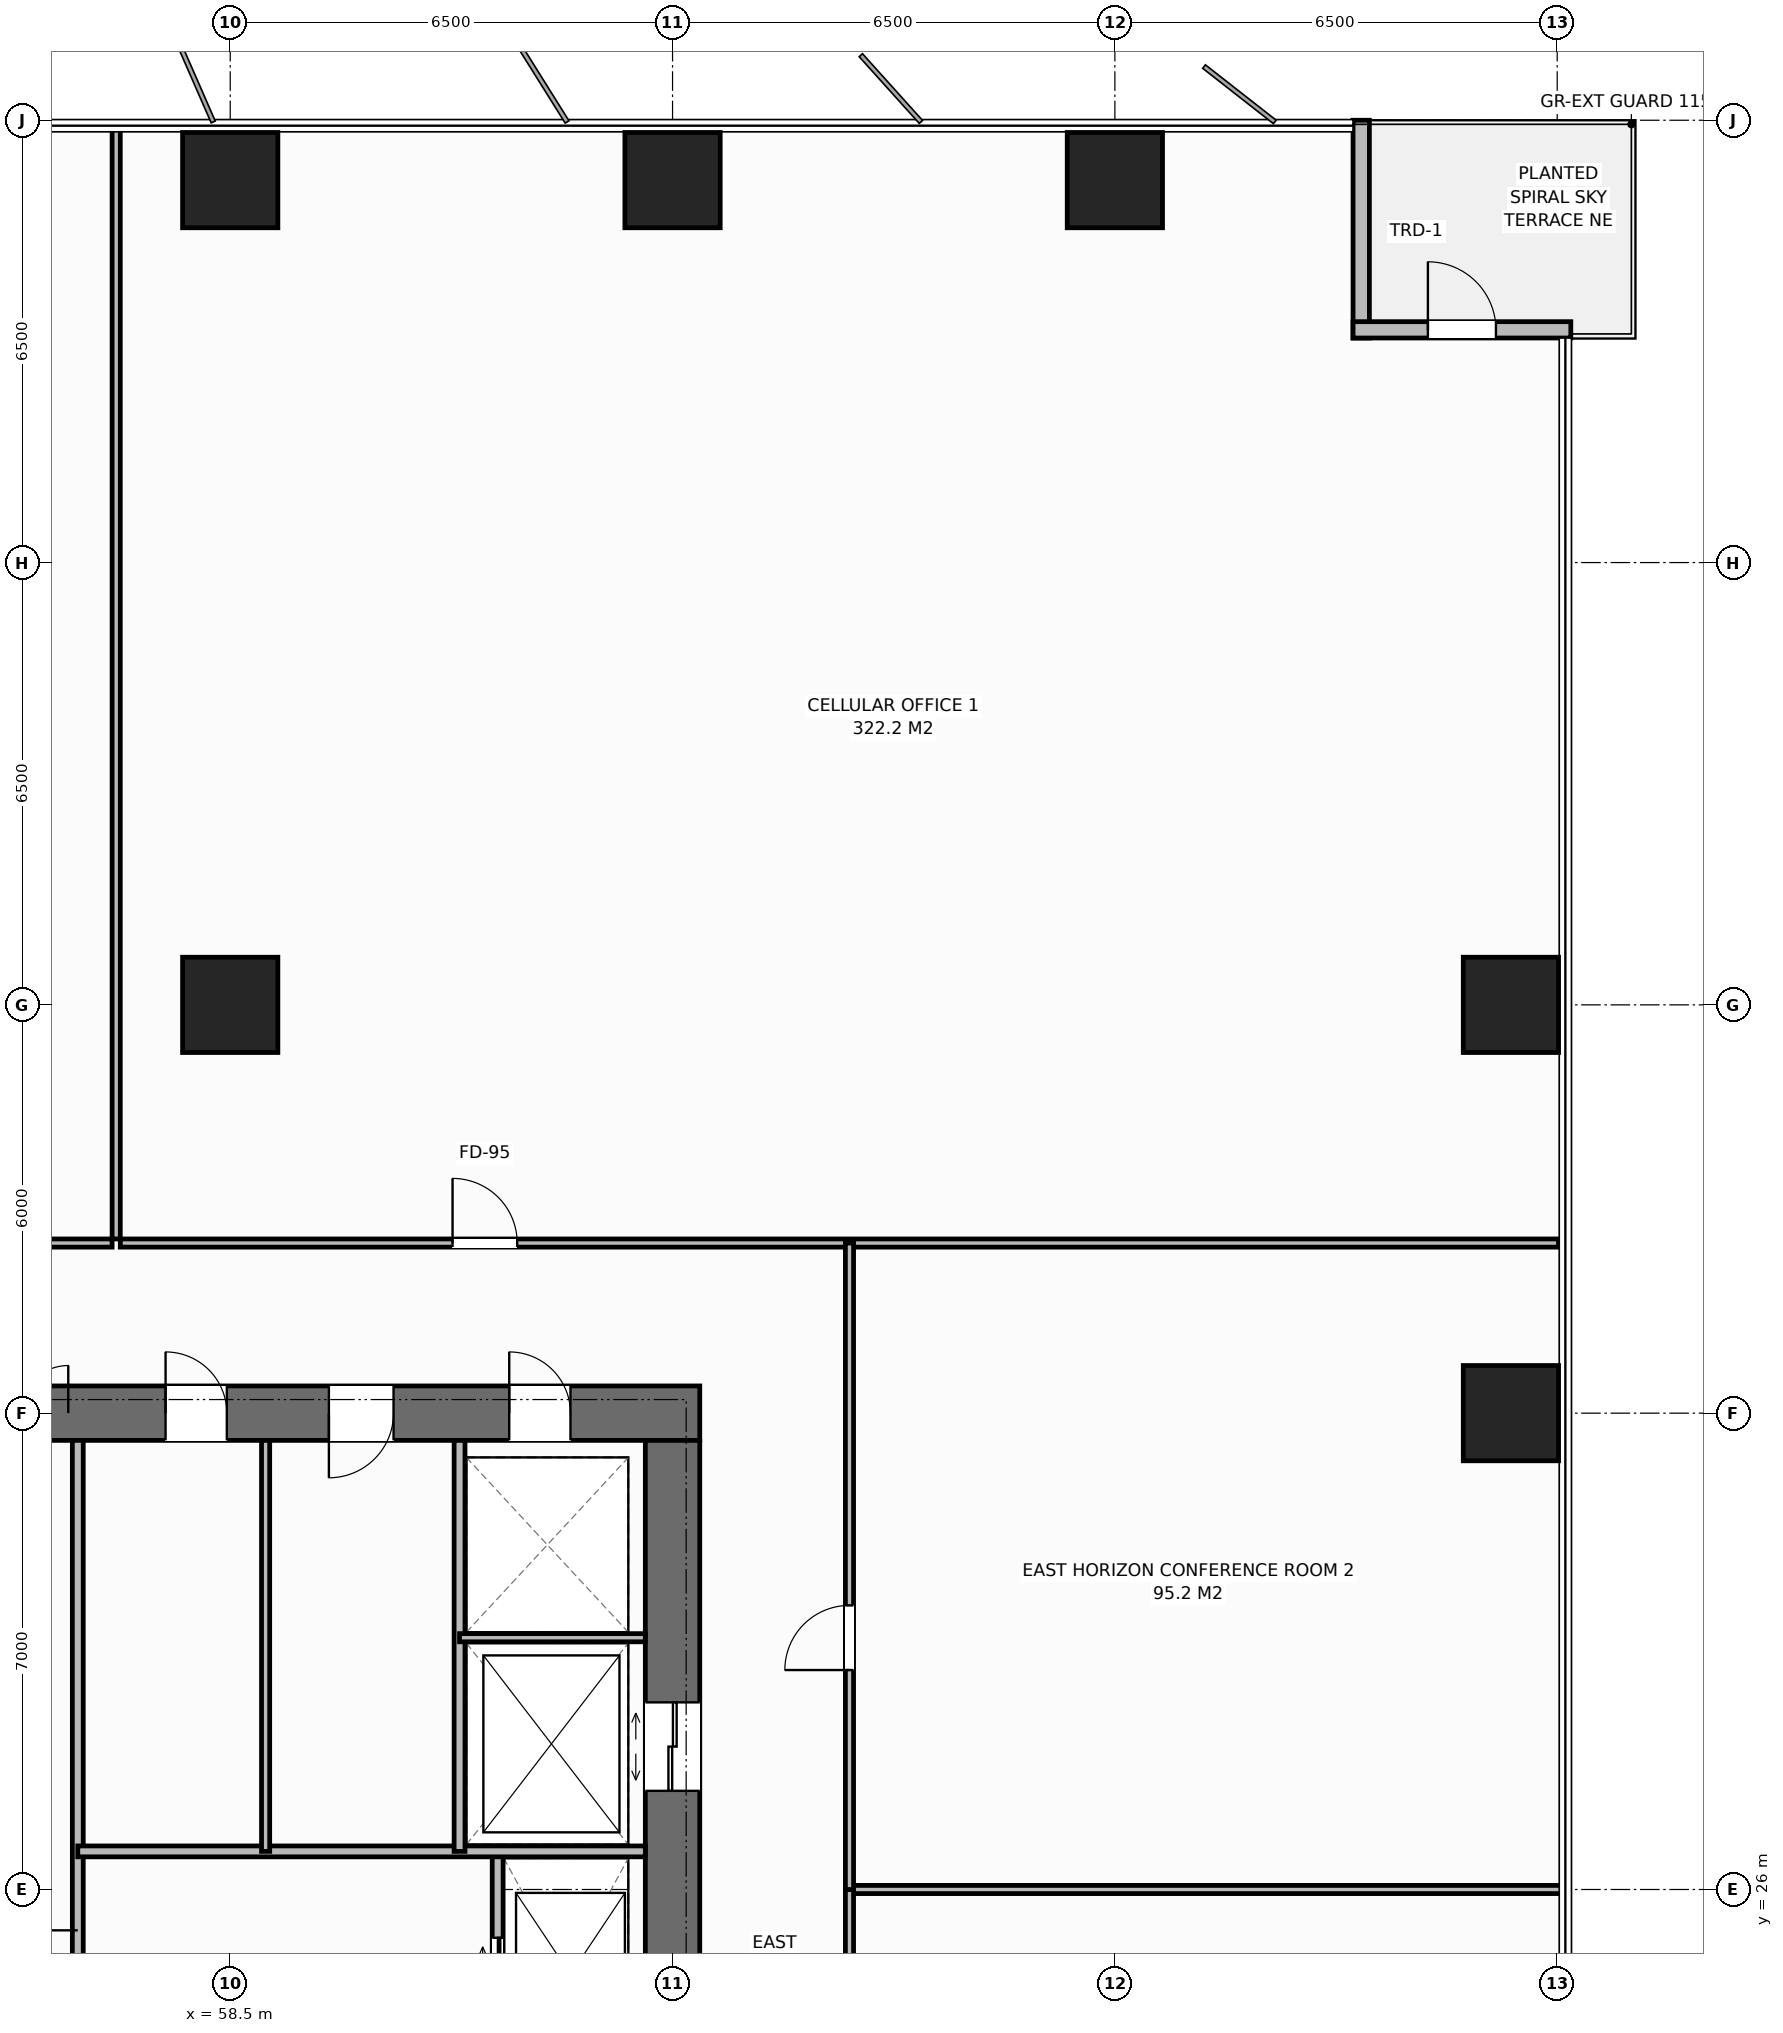
"""IFC4 building model, lengths in metres.
Left out: names, types, materials, properties, quantities, classifications, styles, units other than length and angle.
Written with IfcOpenShell. Run it as: python <this file> out.ifc"""

import sys

from ifc_helpers import new_model, si_unit, direction, frame, frame_2d, origin, origin_2d, place, context, subcontext, project, spatial, rectangle, extrude, element, fill, save


model = new_model("IFC4")
c1 = context("Model", 3, precision=1e-05, world=origin(), true_north=direction((0.0, 1.0)))
c2 = subcontext(c1, "Body", "Model", "MODEL_VIEW")
j1 = project(units=[si_unit("LENGTHUNIT", "METRE"), si_unit("PLANEANGLEUNIT", "RADIAN")], contexts=[c1])
p1 = place(None, origin())
s1 = spatial("IfcSite", under=j1, at=p1, CompositionType="ELEMENT")
p2 = place(p1, origin())
s2 = spatial("IfcBuilding", under=s1, at=p2, CompositionType="ELEMENT")
p3 = place(p2, frame((0.0, 0.0, 62.0)))
s3 = spatial("IfcBuildingStorey", under=s2, at=p3, CompositionType="ELEMENT", Elevation=62.0)
p4 = place(p3, frame((51.6, 33.0, 0.0), z_axis=(0.0, 0.0, 1.0), x_axis=(1.0, 0.0, 0.0)))
e1 = element("IfcWall", 1, at=p4, inside=s3, PredefinedType="SHEAR", context=c2, shape_type="SweptSolid", body=[
    extrude(rectangle(XDim=13.8, YDim=0.8, at=frame_2d((6.9, 0.0))), origin(), (0.0, 0.0, 1.0), 3.8),
])
p5 = place(p4, frame((3.12, 0.0, 0.0)))
e2 = element("IfcOpeningElement", 2, at=p5, cuts=e1, PredefinedType="OPENING", context=c2, shape_type="SweptSolid", body=[
    extrude(rectangle(XDim=1.4, YDim=2.2, at=frame_2d((0.7, 1.1))), frame((0.0, 0.41, 0.0), z_axis=(0.0, -1.0, 0.0), x_axis=(1.0, 0.0, 0.0)), (0.0, 0.0, 1.0), 0.82),
])
p6 = place(p4, frame((11.0, 0.0, 0.0)))
e3 = element("IfcOpeningElement", 3, at=p6, cuts=e1, PredefinedType="OPENING", context=c2, shape_type="SweptSolid", body=[
    extrude(rectangle(XDim=0.9, YDim=2.15, at=frame_2d((0.45, 1.075))), frame((0.0, 0.41, 0.0), z_axis=(0.0, -1.0, 0.0), x_axis=(1.0, 0.0, 0.0)), (0.0, 0.0, 1.0), 0.82),
])
p7 = place(p4, frame((5.95, 0.0, 0.0)))
e4 = element("IfcOpeningElement", 4, at=p7, cuts=e1, PredefinedType="OPENING", context=c2, shape_type="SweptSolid", body=[
    extrude(rectangle(XDim=0.9, YDim=2.15, at=frame_2d((0.45, 1.075))), frame((0.0, 0.41, 0.0), z_axis=(0.0, -1.0, 0.0), x_axis=(1.0, 0.0, 0.0)), (0.0, 0.0, 1.0), 0.82),
])
p8 = place(p4, frame((8.35, 0.0, 0.0)))
e5 = element("IfcOpeningElement", 5, at=p8, cuts=e1, PredefinedType="OPENING", context=c2, shape_type="SweptSolid", body=[
    extrude(rectangle(XDim=0.95, YDim=2.15, at=frame_2d((0.475, 1.075))), frame((0.0, 0.41, 0.0), z_axis=(0.0, -1.0, 0.0), x_axis=(1.0, 0.0, 0.0)), (0.0, 0.0, 1.0), 0.82),
])
p9 = place(p3, frame((65.0, 19.4, 0.0), z_axis=(0.0, 0.0, 1.0), x_axis=(0.0, 1.0, 0.0)))
e6 = element("IfcWall", 6, at=p9, inside=s3, PredefinedType="SHEAR", context=c2, shape_type="SweptSolid", body=[
    extrude(rectangle(XDim=13.2, YDim=0.8, at=frame_2d((6.6, 0.0))), origin(), (0.0, 0.0, 1.0), 3.8),
])
p10 = place(p9, frame((8.05, 0.0, 0.0)))
e7 = element("IfcOpeningElement", 7, at=p10, cuts=e6, PredefinedType="OPENING", context=c2, shape_type="SweptSolid", body=[
    extrude(rectangle(XDim=1.3, YDim=2.2, at=frame_2d((0.65, 1.1))), frame((0.0, 0.41, 0.0), z_axis=(0.0, -1.0, 0.0), x_axis=(1.0, 0.0, 0.0)), (0.0, 0.0, 1.0), 0.82),
])
for number, where, z_axis, x_axis in (
    (8, (58.5, 39.0, 0.0), (0.0, 0.0, 1.0), (1.0, 0.0, 0.0)),
    (9, (58.5, 51.12, 0.0), (0.0, 0.0, 1.0), (1.0, 0.0, 0.0)),
    (10, (65.0, 51.12, 0.0), (0.0, 0.0, 1.0), (1.0, 0.0, 0.0)),
    (11, (71.5, 51.12, 0.0), (0.0, 0.0, 1.0), (1.0, 0.0, 0.0)),
    (12, (77.32, 33.0, 0.0), (0.0, 0.0, 1.0), (1.0, 0.0, 0.0)),
    (13, (77.32, 39.0, 0.0), (0.0, 0.0, 1.0), (1.0, 0.0, 0.0)),
):
    element("IfcColumn", number, at=place(p3, frame(where, z_axis=z_axis, x_axis=x_axis)), inside=s3, PredefinedType="COLUMN", context=c2, shape_type="SweptSolid", body=[
        extrude(rectangle(XDim=1.4, YDim=1.4, at=origin_2d()), origin(), (0.0, 0.0, 1.0), 3.8),
    ])
p11 = place(p3, frame((75.12, 52.0, 0.0), z_axis=(0.0, 0.0, 1.0), x_axis=(0.0, -1.0, 0.0)))
e14 = element("IfcWall", 14, at=p11, inside=s3, PredefinedType="STANDARD", context=c2, shape_type="SweptSolid", body=[
    extrude(rectangle(XDim=3.2, YDim=0.24, at=frame_2d((1.6, 0.0))), origin(), (0.0, 0.0, 1.0), 3.55),
])
p12 = place(p3, frame((75.0, 48.92, 0.0), z_axis=(0.0, 0.0, 1.0), x_axis=(1.0, 0.0, 0.0)))
e15 = element("IfcWall", 15, at=p12, inside=s3, PredefinedType="STANDARD", context=c2, shape_type="SweptSolid", body=[
    extrude(rectangle(XDim=3.2, YDim=0.24, at=frame_2d((1.6, 0.0))), origin(), (0.0, 0.0, 1.0), 3.55),
])
p13 = place(p12, frame((1.1, 0.0, 0.0)))
e16 = element("IfcOpeningElement", 16, at=p13, cuts=e15, PredefinedType="OPENING", context=c2, shape_type="SweptSolid", body=[
    extrude(rectangle(XDim=1.0, YDim=2.2, at=frame_2d((0.5, 1.1))), frame((0.0, 0.13, 0.0), z_axis=(0.0, -1.0, 0.0), x_axis=(1.0, 0.0, 0.0)), (0.0, 0.0, 1.0), 0.26),
])
p14 = place(p3, frame((56.26, 23.09, 0.0), z_axis=(0.0, 0.0, 1.0), x_axis=(0.0, 1.0, 0.0)))
e17 = element("IfcWall", 17, at=p14, inside=s3, PredefinedType="STANDARD", context=c2, shape_type="SweptSolid", body=[
    extrude(rectangle(XDim=9.51, YDim=0.16, at=frame_2d((4.755, 0.0))), origin(), (0.0, 0.0, 1.0), 3.55),
])
p15 = place(p14, frame((1.01, 0.0, 0.0)))
e18 = element("IfcOpeningElement", 18, at=p15, cuts=e17, PredefinedType="OPENING", context=c2, shape_type="SweptSolid", body=[
    extrude(rectangle(XDim=1.3, YDim=2.2, at=frame_2d((0.65, 1.1))), frame((0.0, 0.09, 0.0), z_axis=(0.0, -1.0, 0.0), x_axis=(1.0, 0.0, 0.0)), (0.0, 0.0, 1.0), 0.18),
])
p16 = place(p3, frame((62.43, 23.09, 0.0), z_axis=(0.0, 0.0, 1.0), x_axis=(0.0, 1.0, 0.0)))
e19 = element("IfcWall", 19, at=p16, inside=s3, PredefinedType="STANDARD", context=c2, shape_type="SweptSolid", body=[
    extrude(rectangle(XDim=3.47, YDim=0.16, at=frame_2d((1.735, 0.0))), origin(), (0.0, 0.0, 1.0), 3.55),
])
p17 = place(p16, frame((1.1, 0.0, 0.0)))
e20 = element("IfcOpeningElement", 20, at=p17, cuts=e19, PredefinedType="OPENING", context=c2, shape_type="SweptSolid", body=[
    extrude(rectangle(XDim=1.1, YDim=2.2, at=frame_2d((0.55, 1.1))), frame((0.0, 0.09, 0.0), z_axis=(0.0, -1.0, 0.0), x_axis=(1.0, 0.0, 0.0)), (0.0, 0.0, 1.0), 0.18),
])
p18 = place(p3, frame((56.26, 26.56, 0.0), z_axis=(0.0, 0.0, 1.0), x_axis=(1.0, 0.0, 0.0)))
e21 = element("IfcWall", 21, at=p18, inside=s3, PredefinedType="STANDARD", context=c2, shape_type="SweptSolid", body=[
    extrude(rectangle(XDim=8.34, YDim=0.16, at=frame_2d((4.17, 0.0))), origin(), (0.0, 0.0, 1.0), 3.55),
])
p19 = place(p3, frame((61.87, 26.56, 0.0), z_axis=(0.0, 0.0, 1.0), x_axis=(0.0, 1.0, 0.0)))
e22 = element("IfcWall", 22, at=p19, inside=s3, PredefinedType="STANDARD", context=c2, shape_type="SweptSolid", body=[
    extrude(rectangle(XDim=6.04, YDim=0.16, at=frame_2d((3.02, 0.0))), origin(), (0.0, 0.0, 1.0), 3.55),
])
p20 = place(p3, frame((61.87, 29.7, 0.0), z_axis=(0.0, 0.0, 1.0), x_axis=(1.0, 0.0, 0.0)))
e23 = element("IfcWall", 23, at=p20, inside=s3, PredefinedType="PARTITIONING", context=c2, shape_type="SweptSolid", body=[
    extrude(rectangle(XDim=2.73, YDim=0.12, at=frame_2d((1.365, 0.0))), origin(), (0.0, 0.0, 1.0), 3.55),
])
p21 = place(p3, frame((59.02, 26.56, 0.0), z_axis=(0.0, 0.0, 1.0), x_axis=(0.0, 1.0, 0.0)))
e24 = element("IfcWall", 24, at=p21, inside=s3, PredefinedType="PARTITIONING", context=c2, shape_type="SweptSolid", body=[
    extrude(rectangle(XDim=6.04, YDim=0.12, at=frame_2d((3.02, 0.0))), origin(), (0.0, 0.0, 1.0), 3.55),
])
p22 = place(p3, frame((56.824, 35.56, 0.0), z_axis=(0.0, 0.0, 1.0), x_axis=(0.0, 1.0, 0.0)))
e25 = element("IfcWall", 25, at=p22, inside=s3, PredefinedType="PARTITIONING", context=c2, shape_type="SweptSolid", body=[
    extrude(rectangle(XDim=16.42, YDim=0.12, at=frame_2d((8.21, 0.0))), origin(), (0.0, 0.0, 1.0), 3.55),
])
p23 = place(p3, frame((34.588, 35.5, 0.0), z_axis=(0.0, 0.0, 1.0), x_axis=(1.0, 0.0, 0.0)))
e26 = element("IfcWall", 26, at=p23, inside=s3, PredefinedType="PARTITIONING", context=c2, shape_type="SweptSolid", body=[
    extrude(rectangle(XDim=22.176, YDim=0.12, at=frame_2d((11.088, 0.0))), origin(), (0.0, 0.0, 1.0), 3.55),
])
p24 = place(p23, frame((0.48, 0.0, 0.0)))
e27 = element("IfcOpeningElement", 27, at=p24, cuts=e26, PredefinedType="OPENING", context=c2, shape_type="SweptSolid", body=[
    extrude(rectangle(XDim=0.95, YDim=2.15, at=frame_2d((0.475, 1.075))), frame((0.0, 0.07, 0.0), z_axis=(0.0, -1.0, 0.0), x_axis=(1.0, 0.0, 0.0)), (0.0, 0.0, 1.0), 0.14),
])
p25 = place(p3, frame((56.884, 35.5, 0.0), z_axis=(0.0, 0.0, 1.0), x_axis=(1.0, 0.0, 0.0)))
e28 = element("IfcWall", 28, at=p25, inside=s3, PredefinedType="PARTITIONING", context=c2, shape_type="SweptSolid", body=[
    extrude(rectangle(XDim=21.136, YDim=0.12, at=frame_2d((10.568, 0.0))), origin(), (0.0, 0.0, 1.0), 3.55),
])
p26 = place(p25, frame((4.883, 0.0, 0.0)))
e29 = element("IfcOpeningElement", 29, at=p26, cuts=e28, PredefinedType="OPENING", context=c2, shape_type="SweptSolid", body=[
    extrude(rectangle(XDim=0.95, YDim=2.15, at=frame_2d((0.475, 1.075))), frame((0.0, 0.07, 0.0), z_axis=(0.0, -1.0, 0.0), x_axis=(1.0, 0.0, 0.0)), (0.0, 0.0, 1.0), 0.14),
])
p27 = place(p3, frame((67.6, 26.0, 0.0), z_axis=(0.0, 0.0, 1.0), x_axis=(1.0, 0.0, 0.0)))
e30 = element("IfcWall", 30, at=p27, inside=s3, PredefinedType="PARTITIONING", context=c2, shape_type="SweptSolid", body=[
    extrude(rectangle(XDim=10.58, YDim=0.12, at=frame_2d((5.29, 0.0))), origin(), (0.0, 0.0, 1.0), 3.55),
])
p28 = place(p3, frame((67.6, 16.5, 0.0), z_axis=(0.0, 0.0, 1.0), x_axis=(0.0, 1.0, 0.0)))
e31 = element("IfcWall", 31, at=p28, inside=s3, PredefinedType="PARTITIONING", context=c2, shape_type="SweptSolid", body=[
    extrude(rectangle(XDim=9.5, YDim=0.12, at=frame_2d((4.75, 0.0))), origin(), (0.0, 0.0, 1.0), 3.55),
])
p29 = place(p28, frame((5.325, 0.0, 0.0)))
e32 = element("IfcOpeningElement", 32, at=p29, cuts=e31, PredefinedType="OPENING", context=c2, shape_type="SweptSolid", body=[
    extrude(rectangle(XDim=0.95, YDim=2.15, at=frame_2d((0.475, 1.075))), frame((0.0, 0.07, 0.0), z_axis=(0.0, -1.0, 0.0), x_axis=(1.0, 0.0, 0.0)), (0.0, 0.0, 1.0), 0.14),
])
p30 = place(p3, frame((67.6, 26.0, 0.0), z_axis=(0.0, 0.0, 1.0), x_axis=(0.0, 1.0, 0.0)))
e33 = element("IfcWall", 33, at=p30, inside=s3, PredefinedType="PARTITIONING", context=c2, shape_type="SweptSolid", body=[
    extrude(rectangle(XDim=9.5, YDim=0.12, at=frame_2d((4.75, 0.0))), origin(), (0.0, 0.0, 1.0), 3.55),
])
p31 = place(p30, frame((3.225, 0.0, 0.0)))
e34 = element("IfcOpeningElement", 34, at=p31, cuts=e33, PredefinedType="OPENING", context=c2, shape_type="SweptSolid", body=[
    extrude(rectangle(XDim=0.95, YDim=2.15, at=frame_2d((0.475, 1.075))), frame((0.0, 0.07, 0.0), z_axis=(0.0, -1.0, 0.0), x_axis=(1.0, 0.0, 0.0)), (0.0, 0.0, 1.0), 0.14),
])
p32 = place(p13, origin())
e35 = element("IfcDoor", 35, at=p32, inside=s3, OperationType="SINGLE_SWING_LEFT", PredefinedType="DOOR", context=c2, shape_type="SweptSolid", body=[
    extrude(rectangle(XDim=1.0, YDim=2.2, at=frame_2d((0.5, 1.1))), frame((0.0, 0.025, 0.0), z_axis=(0.0, -1.0, 0.0), x_axis=(1.0, 0.0, 0.0)), (0.0, 0.0, 1.0), 0.05),
])
fill(e16, e35)
p33 = place(p5, origin())
e36 = element("IfcDoor", 36, at=p33, inside=s3, OperationType="DOUBLE_DOOR_SINGLE_SWING", PredefinedType="DOOR", context=c2, shape_type="SweptSolid", body=[
    extrude(rectangle(XDim=1.4, YDim=2.2, at=frame_2d((0.7, 1.1))), frame((0.0, -0.075, 0.0), z_axis=(0.0, -1.0, 0.0), x_axis=(1.0, 0.0, 0.0)), (0.0, 0.0, 1.0), 0.05),
])
fill(e2, e36)
p34 = place(p17, origin())
e37 = element("IfcDoor", 37, at=p34, inside=s3, OperationType="DOUBLE_DOOR_SLIDING", PredefinedType="DOOR", context=c2, shape_type="SweptSolid", body=[
    extrude(rectangle(XDim=1.1, YDim=2.2, at=frame_2d((0.55, 1.1))), frame((0.0, 0.025, 0.0), z_axis=(0.0, -1.0, 0.0), x_axis=(1.0, 0.0, 0.0)), (0.0, 0.0, 1.0), 0.05),
])
fill(e20, e37)
p35 = place(p15, origin())
e38 = element("IfcDoor", 38, at=p35, inside=s3, OperationType="DOUBLE_DOOR_SINGLE_SWING", PredefinedType="DOOR", context=c2, shape_type="SweptSolid", body=[
    extrude(rectangle(XDim=1.3, YDim=2.2, at=frame_2d((0.65, 1.1))), frame((0.0, 0.025, 0.0), z_axis=(0.0, -1.0, 0.0), x_axis=(1.0, 0.0, 0.0)), (0.0, 0.0, 1.0), 0.05),
])
fill(e18, e38)
p36 = place(p10, origin())
e39 = element("IfcDoor", 39, at=p36, inside=s3, OperationType="DOUBLE_DOOR_SLIDING", PredefinedType="DOOR", context=c2, shape_type="SweptSolid", body=[
    extrude(rectangle(XDim=1.3, YDim=2.2, at=frame_2d((0.65, 1.1))), frame((0.0, 0.025, 0.0), z_axis=(0.0, -1.0, 0.0), x_axis=(1.0, 0.0, 0.0)), (0.0, 0.0, 1.0), 0.05),
])
fill(e7, e39)
p37 = place(p6, origin())
e40 = element("IfcDoor", 40, at=p37, inside=s3, OperationType="SINGLE_SWING_LEFT", PredefinedType="DOOR", context=c2, shape_type="SweptSolid", body=[
    extrude(rectangle(XDim=0.9, YDim=2.15, at=frame_2d((0.45, 1.075))), frame((0.0, -0.075, 0.0), z_axis=(0.0, -1.0, 0.0), x_axis=(1.0, 0.0, 0.0)), (0.0, 0.0, 1.0), 0.05),
])
fill(e3, e40)
p38 = place(p7, origin())
e41 = element("IfcDoor", 41, at=p38, inside=s3, OperationType="SINGLE_SWING_LEFT", PredefinedType="DOOR", context=c2, shape_type="SweptSolid", body=[
    extrude(rectangle(XDim=0.9, YDim=2.15, at=frame_2d((0.45, 1.075))), frame((0.0, -0.075, 0.0), z_axis=(0.0, -1.0, 0.0), x_axis=(1.0, 0.0, 0.0)), (0.0, 0.0, 1.0), 0.05),
])
fill(e4, e41)
p39 = place(p8, origin())
e42 = element("IfcDoor", 42, at=p39, inside=s3, OperationType="SINGLE_SWING_RIGHT", PredefinedType="DOOR", context=c2, shape_type="SweptSolid", body=[
    extrude(rectangle(XDim=0.95, YDim=2.15, at=frame_2d((0.475, 1.075))), frame((0.0, -0.075, 0.0), z_axis=(0.0, -1.0, 0.0), x_axis=(1.0, 0.0, 0.0)), (0.0, 0.0, 1.0), 0.05),
])
fill(e5, e42)
p40 = place(p26, origin())
e43 = element("IfcDoor", 43, at=p40, inside=s3, OperationType="SINGLE_SWING_LEFT", PredefinedType="DOOR", context=c2, shape_type="SweptSolid", body=[
    extrude(rectangle(XDim=0.95, YDim=2.15, at=frame_2d((0.475, 1.075))), frame((0.0, 0.025, 0.0), z_axis=(0.0, -1.0, 0.0), x_axis=(1.0, 0.0, 0.0)), (0.0, 0.0, 1.0), 0.05),
])
fill(e29, e43)
p41 = place(p31, origin())
e44 = element("IfcDoor", 44, at=p41, inside=s3, OperationType="SINGLE_SWING_LEFT", PredefinedType="DOOR", context=c2, shape_type="SweptSolid", body=[
    extrude(rectangle(XDim=0.95, YDim=2.15, at=frame_2d((0.475, 1.075))), frame((0.0, 0.025, 0.0), z_axis=(0.0, -1.0, 0.0), x_axis=(1.0, 0.0, 0.0)), (0.0, 0.0, 1.0), 0.05),
])
fill(e34, e44)
save(model, sys.argv[1])
